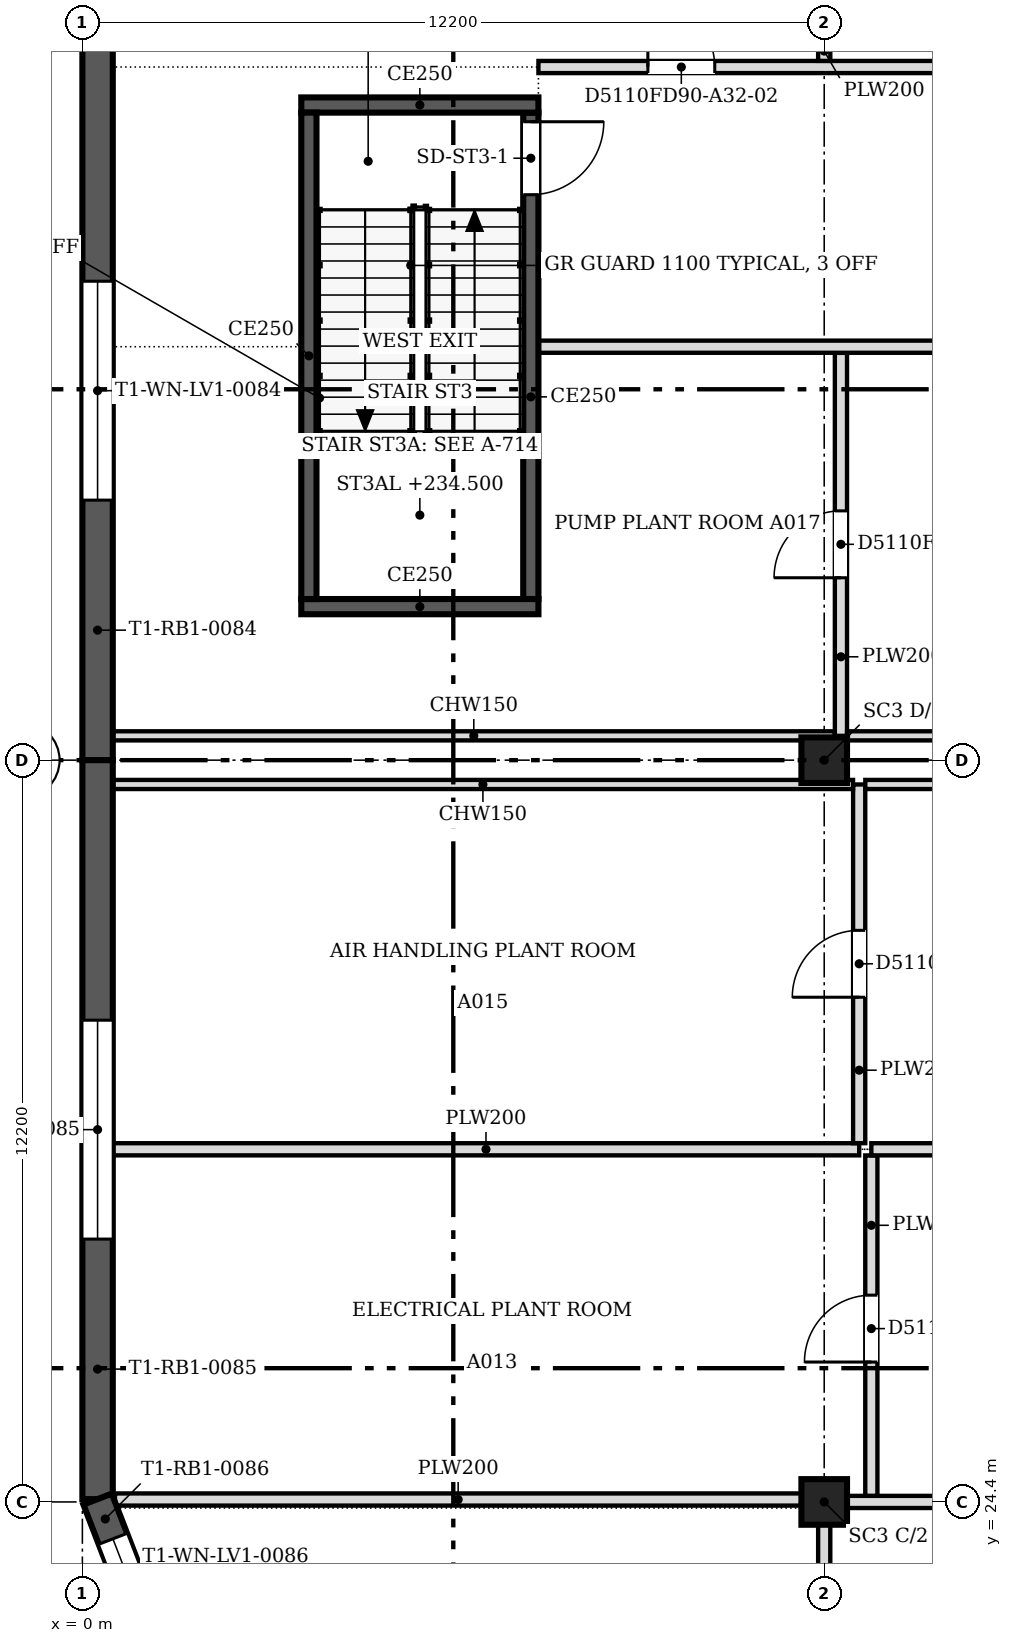
"""IFC4 building model, lengths in metres.
Left out: names, types, materials, properties, quantities, classifications, styles, units other than length and angle.
Written with IfcOpenShell. Run it as: python <this file> out.ifc"""

import sys

from ifc_helpers import new_model, si_unit, direction, frame, frame_2d, origin, origin_2d, place, context, subcontext, project, spatial, polyline, rectangle, outline, extrude, faceted_brep, source, transform, mapped, element, fill, save


model = new_model("IFC4")
c1 = context("Model", 3, precision=1e-05, world=origin(), true_north=direction((0.0, 1.0)))
c2 = subcontext(c1, "Body", "Model", "MODEL_VIEW")
j1 = project(units=[si_unit("LENGTHUNIT", "METRE"), si_unit("PLANEANGLEUNIT", "RADIAN")], contexts=[c1])
p1 = place(None, origin())
s1 = spatial("IfcSite", under=j1, at=p1, CompositionType="ELEMENT")
p2 = place(p1, origin())
s2 = spatial("IfcBuilding", under=s1, at=p2, CompositionType="ELEMENT")
p3 = place(p2, frame((0.0, 0.0, 232.1)))
s3 = spatial("IfcBuildingStorey", under=s2, at=p3, CompositionType="ELEMENT", Elevation=232.1)
for number, where, z_axis, x_axis in (
    (1, (12.2, 24.4, 0.0), (0.0, 0.0, 1.0), (1.0, 0.0, 0.0)),
    (2, (12.2, 36.6, 0.0), (0.0, 0.0, 1.0), (1.0, 0.0, 0.0)),
):
    element("IfcColumn", number, at=place(p3, frame(where, z_axis=z_axis, x_axis=x_axis)), inside=s3, PredefinedType="COLUMN", context=c2, shape_type="SweptSolid", body=[
        extrude(rectangle(XDim=0.75, YDim=0.75, at=origin_2d()), origin(), (0.0, 0.0, 1.0), 4.6),
    ])
m1 = source(origin(), c2, "Body", "Brep", [
    faceted_brep([(0.0, -0.25, 0.0), (12.154, -0.25, 0.0), (12.154, -0.25, 4.8), (0.0, -0.25, 4.8), (0.047, 0.25, 4.8), (12.154, 0.25, 4.8), (12.154, 0.25, 0.0), (0.047, 0.25, 0.0), (0.0, 0.0, 0.0), (0.0, 0.0, 4.8)], [[[0, 1, 2, 3]], [[4, 5, 6, 7]], [[7, 6, 1, 0, 8]], [[5, 4, 9, 3, 2]], [[8, 0, 3, 9]], [[7, 8, 9, 4]], [[1, 6, 5, 2]]]),
])
p4 = place(p3, frame((0.25, 48.753, 0.0), z_axis=(0.0, 0.0, 1.0), x_axis=(0.0, -1.0, 0.0)))
e3 = element("IfcWall", 3, at=p4, inside=s3, PredefinedType="SOLIDWALL", context=c2, shape_type="MappedRepresentation", body=[
    mapped(m1, transform((0.0, 0.0, 0.0), scale=1.0)),
])
m2 = source(origin(), c2, "Body", "SweptSolid", [
    extrude(outline(polyline([(4.277, 0.8), (7.877, 0.8), (7.877, 4.0), (4.277, 4.0), (4.277, 0.8)])), frame((0.0, 0.26, 0.0), z_axis=(0.0, -1.0, 0.0), x_axis=(1.0, 0.0, 0.0)), (0.0, 0.0, 1.0), 0.52),
])
p5 = place(p4, origin())
e4 = element("IfcOpeningElement", 4, at=p5, cuts=e3, PredefinedType="OPENING", context=c2, shape_type="MappedRepresentation", body=[
    mapped(m2, transform((0.0, 0.0, 0.0), scale=1.0)),
])
m3 = source(origin(), c2, "Body", "Brep", [
    faceted_brep([(0.0, -0.25, 0.0), (12.154, -0.25, 0.0), (12.154, -0.25, 4.8), (0.0, -0.25, 4.8), (0.0, 0.25, 4.8), (12.107, 0.25, 4.8), (12.107, 0.25, 0.0), (0.0, 0.25, 0.0), (12.154, -0.0, 0.0), (12.154, -0.0, 4.8)], [[[0, 1, 2, 3]], [[4, 5, 6, 7]], [[7, 6, 8, 1, 0]], [[9, 2, 1, 8]], [[5, 4, 3, 2, 9]], [[4, 7, 0, 3]], [[8, 6, 5, 9]]]),
])
p6 = place(p3, frame((0.25, 36.6, 0.0), z_axis=(0.0, 0.0, 1.0), x_axis=(0.0, -1.0, 0.0)))
e5 = element("IfcWall", 5, at=p6, inside=s3, PredefinedType="SOLIDWALL", context=c2, shape_type="MappedRepresentation", body=[
    mapped(m3, transform((0.0, 0.0, 0.0), scale=1.0)),
])
p7 = place(p6, origin())
e6 = element("IfcOpeningElement", 6, at=p7, cuts=e5, PredefinedType="OPENING", context=c2, shape_type="MappedRepresentation", body=[
    mapped(m2, transform((0.0, 0.0, 0.0), scale=1.0)),
])
m4 = source(origin(), c2, "Body", "Brep", [
    faceted_brep([(0.0, -0.25, 0.0), (2.95, -0.25, 0.0), (2.95, -0.25, 4.8), (0.0, -0.25, 4.8), (0.047, 0.25, 4.8), (2.898, 0.25, 4.8), (2.898, 0.25, 0.0), (0.047, 0.25, 0.0), (2.95, 0.0, 0.0), (0.0, 0.0, 0.0), (2.95, 0.0, 4.8), (0.0, 0.0, 4.8)], [[[0, 1, 2, 3]], [[4, 5, 6, 7]], [[7, 6, 8, 1, 0, 9]], [[10, 2, 1, 8]], [[5, 4, 11, 3, 2, 10]], [[9, 0, 3, 11]], [[7, 9, 11, 4]], [[8, 6, 5, 10]]]),
])
p8 = place(p3, frame((0.25, 24.447, 0.0), z_axis=(0.0, 0.0, 1.0), x_axis=(0.359877213415, -0.932999673775, 0.0)))
e7 = element("IfcWall", 7, at=p8, inside=s3, PredefinedType="SOLIDWALL", context=c2, shape_type="MappedRepresentation", body=[
    mapped(m4, transform((0.0, 0.0, 0.0), scale=1.0)),
])
m5 = source(origin(), c2, "Body", "SweptSolid", [
    extrude(outline(polyline([(0.7, 0.8), (2.25, 0.8), (2.25, 4.0), (0.7, 4.0), (0.7, 0.8)])), frame((0.0, 0.26, 0.0), z_axis=(0.0, -1.0, 0.0), x_axis=(1.0, 0.0, 0.0)), (0.0, 0.0, 1.0), 0.52),
])
p9 = place(p8, origin())
e8 = element("IfcOpeningElement", 8, at=p9, cuts=e7, PredefinedType="OPENING", context=c2, shape_type="MappedRepresentation", body=[
    mapped(m5, transform((0.0, 0.0, 0.0), scale=1.0)),
])
p10 = place(p3, frame((7.5, 39.125, 0.0), z_axis=(0.0, 0.0, 1.0), x_axis=(-1.0, 0.0, 0.0)))
e9 = element("IfcWall", 9, at=p10, inside=s3, PredefinedType="SOLIDWALL", context=c2, shape_type="SweptSolid", body=[
    extrude(rectangle(XDim=3.9, YDim=0.25, at=frame_2d((1.95, 0.0))), origin(), (0.0, 0.0, 1.0), 4.8),
])
p11 = place(p3, frame((3.725, 39.25, 0.0), z_axis=(0.0, 0.0, 1.0), x_axis=(0.0, 1.0, 0.0)))
e10 = element("IfcWall", 10, at=p11, inside=s3, PredefinedType="SOLIDWALL", context=c2, shape_type="SweptSolid", body=[
    extrude(rectangle(XDim=8.0, YDim=0.25, at=frame_2d((4.0, 0.0))), origin(), (0.0, 0.0, 1.0), 4.8),
])
p12 = place(p3, frame((3.6, 47.375, 0.0), z_axis=(0.0, 0.0, 1.0), x_axis=(1.0, 0.0, 0.0)))
e11 = element("IfcWall", 11, at=p12, inside=s3, PredefinedType="SOLIDWALL", context=c2, shape_type="SweptSolid", body=[
    extrude(rectangle(XDim=3.9, YDim=0.25, at=frame_2d((1.95, 0.0))), origin(), (0.0, 0.0, 1.0), 4.8),
])
p13 = place(p3, frame((7.375, 47.25, 0.0), z_axis=(0.0, 0.0, 1.0), x_axis=(0.0, -1.0, 0.0)))
e12 = element("IfcWall", 12, at=p13, inside=s3, PredefinedType="SOLIDWALL", context=c2, shape_type="SweptSolid", body=[
    extrude(rectangle(XDim=8.0, YDim=0.25, at=frame_2d((4.0, 0.0))), origin(), (0.0, 0.0, 1.0), 4.8),
])
m6 = source(origin(), c2, "Body", "SweptSolid", [
    extrude(rectangle(XDim=1.2, YDim=2.1, at=frame_2d((0.6, 1.05))), frame((0.0, 0.135, 0.0), z_axis=(0.0, -1.0, 0.0), x_axis=(1.0, 0.0, 0.0)), (0.0, 0.0, 1.0), 0.27),
])
p14 = place(p13, frame((0.15, 0.0, 0.0)))
e13 = element("IfcOpeningElement", 13, at=p14, cuts=e12, PredefinedType="OPENING", context=c2, shape_type="MappedRepresentation", body=[
    mapped(m6, transform((0.0, 0.0, 0.0), scale=1.0)),
])
p15 = place(p3, frame((12.2, 18.8, 0.0), z_axis=(0.0, 0.0, 1.0), x_axis=(0.0, 1.0, 0.0)))
e14 = element("IfcWall", 14, at=p15, inside=s3, PredefinedType="PARTITIONING", context=c2, shape_type="SweptSolid", body=[
    extrude(rectangle(XDim=5.224, YDim=0.2, at=frame_2d((2.612, 0.0))), origin(), (0.0, 0.0, 1.0), 3.817),
])
m7 = source(origin(), c2, "Body", "SweptSolid", [
    extrude(rectangle(XDim=1.1, YDim=2.1, at=frame_2d((0.55, 1.05))), frame((0.0, 0.11, 0.0), z_axis=(0.0, -1.0, 0.0), x_axis=(1.0, 0.0, 0.0)), (0.0, 0.0, 1.0), 0.22),
])
p16 = place(p15, frame((2.1, 0.0, 0.0)))
e15 = element("IfcOpeningElement", 15, at=p16, cuts=e14, PredefinedType="OPENING", context=c2, shape_type="MappedRepresentation", body=[
    mapped(m7, transform((0.0, 0.0, 0.0), scale=1.0)),
])
p17 = place(p3, frame((0.536, 24.44, 0.0), z_axis=(0.0, 0.0, 1.0), x_axis=(1.0, 0.0, 0.0)))
e16 = element("IfcWall", 16, at=p17, inside=s3, PredefinedType="PARTITIONING", context=c2, shape_type="SweptSolid", body=[
    extrude(rectangle(XDim=11.288, YDim=0.2, at=frame_2d((5.644, 0.0))), origin(), (0.0, 0.0, 1.0), 3.817),
])
p18 = place(p3, frame((12.576, 24.4, 0.0), z_axis=(0.0, 0.0, 1.0), x_axis=(1.0, 0.0, 0.0)))
e17 = element("IfcWall", 17, at=p18, inside=s3, PredefinedType="PARTITIONING", context=c2, shape_type="SweptSolid", body=[
    extrude(rectangle(XDim=11.448, YDim=0.2, at=frame_2d((5.724, 0.0))), origin(), (0.0, 0.0, 1.0), 3.817),
])
p19 = place(p3, frame((12.975, 24.501, 0.0), z_axis=(0.0, 0.0, 1.0), x_axis=(0.0, 1.0, 0.0)))
e18 = element("IfcWall", 18, at=p19, inside=s3, PredefinedType="PARTITIONING", context=c2, shape_type="SweptSolid", body=[
    extrude(rectangle(XDim=5.598, YDim=0.2, at=frame_2d((2.799, 0.0))), origin(), (0.0, 0.0, 1.0), 3.817),
])
p20 = place(p19, frame((2.2, 0.0, 0.0)))
e19 = element("IfcOpeningElement", 19, at=p20, cuts=e18, PredefinedType="OPENING", context=c2, shape_type="MappedRepresentation", body=[
    mapped(m7, transform((0.0, 0.0, 0.0), scale=1.0)),
])
p21 = place(p3, frame((0.5, 30.2, 0.0), z_axis=(0.0, 0.0, 1.0), x_axis=(1.0, 0.0, 0.0)))
e20 = element("IfcWall", 20, at=p21, inside=s3, PredefinedType="PARTITIONING", context=c2, shape_type="SweptSolid", body=[
    extrude(rectangle(XDim=12.275, YDim=0.2, at=frame_2d((6.137, 0.0))), origin(), (0.0, 0.0, 1.0), 3.817),
])
p22 = place(p3, frame((12.975, 30.2, 0.0), z_axis=(0.0, 0.0, 1.0), x_axis=(1.0, 0.0, 0.0)))
e21 = element("IfcWall", 21, at=p22, inside=s3, PredefinedType="PARTITIONING", context=c2, shape_type="SweptSolid", body=[
    extrude(rectangle(XDim=15.125, YDim=0.2, at=frame_2d((7.562, 0.0))), origin(), (0.0, 0.0, 1.0), 3.817),
])
p23 = place(p3, frame((12.775, 30.301, 0.0), z_axis=(0.0, 0.0, 1.0), x_axis=(0.0, 1.0, 0.0)))
e22 = element("IfcWall", 22, at=p23, inside=s3, PredefinedType="PARTITIONING", context=c2, shape_type="SweptSolid", body=[
    extrude(rectangle(XDim=5.899, YDim=0.2, at=frame_2d((2.949, 0.0))), origin(), (0.0, 0.0, 1.0), 3.817),
])
p24 = place(p23, frame((2.4, 0.0, 0.0)))
e23 = element("IfcOpeningElement", 23, at=p24, cuts=e22, PredefinedType="OPENING", context=c2, shape_type="MappedRepresentation", body=[
    mapped(m7, transform((0.0, 0.0, 0.0), scale=1.0)),
])
p25 = place(p3, frame((0.5, 36.2, 0.0), z_axis=(0.0, 0.0, 1.0), x_axis=(1.0, 0.0, 0.0)))
e24 = element("IfcWall", 24, at=p25, inside=s3, PredefinedType="PARTITIONING", context=c2, shape_type="SweptSolid", body=[
    extrude(rectangle(XDim=12.174, YDim=0.15, at=frame_2d((6.087, 0.0))), origin(), (0.0, 0.0, 1.0), 3.817),
])
p26 = place(p3, frame((12.876, 36.2, 0.0), z_axis=(0.0, 0.0, 1.0), x_axis=(1.0, 0.0, 0.0)))
e25 = element("IfcWall", 25, at=p26, inside=s3, PredefinedType="PARTITIONING", context=c2, shape_type="SweptSolid", body=[
    extrude(rectangle(XDim=15.123, YDim=0.15, at=frame_2d((7.562, 0.0))), origin(), (0.0, 0.0, 1.0), 3.817),
])
p27 = place(p3, frame((0.5, 37.0, 0.0), z_axis=(0.0, 0.0, 1.0), x_axis=(1.0, 0.0, 0.0)))
e26 = element("IfcWall", 26, at=p27, inside=s3, PredefinedType="PARTITIONING", context=c2, shape_type="SweptSolid", body=[
    extrude(rectangle(XDim=11.874, YDim=0.15, at=frame_2d((5.937, 0.0))), origin(), (0.0, 0.0, 1.0), 3.817),
])
p28 = place(p3, frame((12.475, 37.0, 0.0), z_axis=(0.0, 0.0, 1.0), x_axis=(0.0, 1.0, 0.0)))
e27 = element("IfcWall", 27, at=p28, inside=s3, PredefinedType="PARTITIONING", context=c2, shape_type="SweptSolid", body=[
    extrude(rectangle(XDim=6.299, YDim=0.2, at=frame_2d((3.149, 0.0))), origin(), (0.0, 0.0, 1.0), 3.817),
])
p29 = place(p28, frame((2.6, 0.0, 0.0)))
e28 = element("IfcOpeningElement", 28, at=p29, cuts=e27, PredefinedType="OPENING", context=c2, shape_type="MappedRepresentation", body=[
    mapped(m7, transform((0.0, 0.0, 0.0), scale=1.0)),
])
p30 = place(p3, frame((12.576, 37.0, 0.0), z_axis=(0.0, 0.0, 1.0), x_axis=(1.0, 0.0, 0.0)))
e29 = element("IfcWall", 29, at=p30, inside=s3, PredefinedType="PARTITIONING", context=c2, shape_type="SweptSolid", body=[
    extrude(rectangle(XDim=15.423, YDim=0.15, at=frame_2d((7.711, 0.0))), origin(), (0.0, 0.0, 1.0), 3.817),
])
p31 = place(p3, frame((7.5, 43.4, 0.0), z_axis=(0.0, 0.0, 1.0), x_axis=(1.0, 0.0, 0.0)))
e30 = element("IfcWall", 30, at=p31, inside=s3, PredefinedType="PARTITIONING", context=c2, shape_type="SweptSolid", body=[
    extrude(rectangle(XDim=20.6, YDim=0.2, at=frame_2d((10.3, 0.0))), origin(), (0.0, 0.0, 1.0), 3.817),
])
p32 = place(p3, frame((7.5, 48.0, 0.0), z_axis=(0.0, 0.0, 1.0), x_axis=(1.0, 0.0, 0.0)))
e31 = element("IfcWall", 31, at=p32, inside=s3, PredefinedType="PARTITIONING", context=c2, shape_type="SweptSolid", body=[
    extrude(rectangle(XDim=20.6, YDim=0.2, at=frame_2d((10.3, 0.0))), origin(), (0.0, 0.0, 1.0), 3.817),
])
p33 = place(p32, frame((1.8, 0.0, 0.0)))
e32 = element("IfcOpeningElement", 32, at=p33, cuts=e31, PredefinedType="OPENING", context=c2, shape_type="MappedRepresentation", body=[
    mapped(m7, transform((0.0, 0.0, 0.0), scale=1.0)),
])
p34 = place(p32, frame((12.1, 0.0, 0.0)))
e33 = element("IfcOpeningElement", 33, at=p34, cuts=e31, PredefinedType="OPENING", context=c2, shape_type="MappedRepresentation", body=[
    mapped(m7, transform((0.0, 0.0, 0.0), scale=1.0)),
])
p35 = place(p3, frame((12.2, 48.101, 0.0), z_axis=(0.0, 0.0, 1.0), x_axis=(0.0, 1.0, 0.0)))
e34 = element("IfcWall", 34, at=p35, inside=s3, PredefinedType="PARTITIONING", context=c2, shape_type="SweptSolid", body=[
    extrude(rectangle(XDim=0.323, YDim=0.2, at=frame_2d((0.162, 0.0))), origin(), (0.0, 0.0, 1.0), 3.817),
])
m8 = source(origin(), c2, "Body", "SweptSolid", [
    extrude(outline(polyline([(4.277, 0.8), (7.877, 0.8), (7.877, 4.0), (4.277, 4.0), (4.277, 0.8)])), frame((0.0, 0.03, 0.0), z_axis=(0.0, -1.0, 0.0), x_axis=(1.0, 0.0, 0.0)), (0.0, 0.0, 1.0), 0.06),
])
p36 = place(p5, origin())
e35 = element("IfcWindow", 35, at=p36, inside=s3, PartitioningType="USERDEFINED", PredefinedType="WINDOW", context=c2, shape_type="MappedRepresentation", body=[
    mapped(m8, transform((0.0, 0.0, 0.0), scale=1.0)),
])
fill(e4, e35)
p37 = place(p7, origin())
e36 = element("IfcWindow", 36, at=p37, inside=s3, PartitioningType="USERDEFINED", PredefinedType="WINDOW", context=c2, shape_type="MappedRepresentation", body=[
    mapped(m8, transform((0.0, 0.0, 0.0), scale=1.0)),
])
fill(e6, e36)
m9 = source(origin(), c2, "Body", "SweptSolid", [
    extrude(outline(polyline([(0.7, 0.8), (2.25, 0.8), (2.25, 4.0), (0.7, 4.0), (0.7, 0.8)])), frame((0.0, 0.03, 0.0), z_axis=(0.0, -1.0, 0.0), x_axis=(1.0, 0.0, 0.0)), (0.0, 0.0, 1.0), 0.06),
])
p38 = place(p9, origin())
e37 = element("IfcWindow", 37, at=p38, inside=s3, PartitioningType="USERDEFINED", PredefinedType="WINDOW", context=c2, shape_type="MappedRepresentation", body=[
    mapped(m9, transform((0.0, 0.0, 0.0), scale=1.0)),
])
fill(e8, e37)
m10 = source(origin(), c2, "Body", "SweptSolid", [
    extrude(rectangle(XDim=1.2, YDim=2.1, at=frame_2d((0.6, 1.05))), frame((0.0, 0.025, 0.0), z_axis=(0.0, -1.0, 0.0), x_axis=(1.0, 0.0, 0.0)), (0.0, 0.0, 1.0), 0.05),
])
p39 = place(p14, origin())
e38 = element("IfcDoor", 38, at=p39, inside=s3, OperationType="SINGLE_SWING_LEFT", PredefinedType="DOOR", context=c2, shape_type="MappedRepresentation", body=[
    mapped(m10, transform((0.0, 0.0, 0.0), scale=1.0)),
])
fill(e13, e38)
m11 = source(origin(), c2, "Body", "SweptSolid", [
    extrude(rectangle(XDim=1.1, YDim=2.1, at=frame_2d((0.55, 1.05))), frame((0.0, 0.025, 0.0), z_axis=(0.0, -1.0, 0.0), x_axis=(1.0, 0.0, 0.0)), (0.0, 0.0, 1.0), 0.05),
])
p40 = place(p33, origin())
e39 = element("IfcDoor", 39, at=p40, inside=s3, OperationType="SINGLE_SWING_LEFT", PredefinedType="DOOR", context=c2, shape_type="MappedRepresentation", body=[
    mapped(m11, transform((0.0, 0.0, 0.0), scale=1.0)),
])
fill(e32, e39)
p41 = place(p20, origin())
e40 = element("IfcDoor", 40, at=p41, inside=s3, OperationType="SINGLE_SWING_LEFT", PredefinedType="DOOR", context=c2, shape_type="MappedRepresentation", body=[
    mapped(m11, transform((0.0, 0.0, 0.0), scale=1.0)),
])
fill(e19, e40)
p42 = place(p24, origin())
e41 = element("IfcDoor", 41, at=p42, inside=s3, OperationType="SINGLE_SWING_LEFT", PredefinedType="DOOR", context=c2, shape_type="MappedRepresentation", body=[
    mapped(m11, transform((0.0, 0.0, 0.0), scale=1.0)),
])
fill(e23, e41)
p43 = place(p29, origin())
e42 = element("IfcDoor", 42, at=p43, inside=s3, OperationType="SINGLE_SWING_LEFT", PredefinedType="DOOR", context=c2, shape_type="MappedRepresentation", body=[
    mapped(m11, transform((0.0, 0.0, 0.0), scale=1.0)),
])
fill(e28, e42)
save(model, sys.argv[1])
